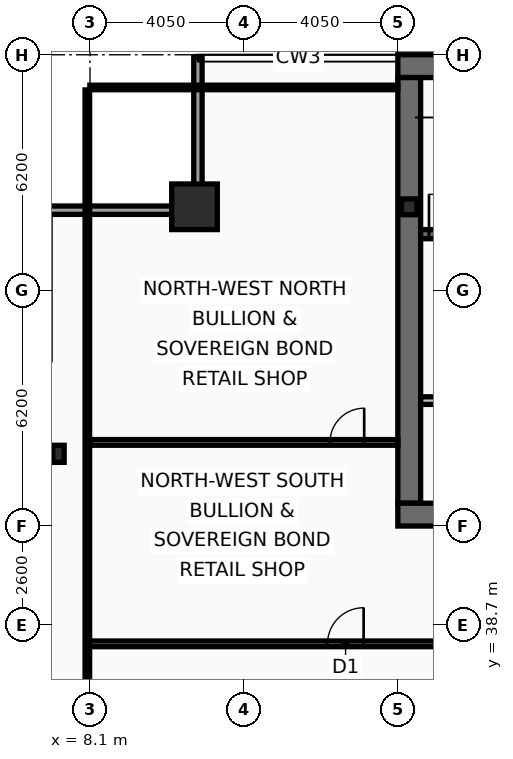
"""IFC4 building model, lengths in metres.
Left out: names, types, materials, properties, quantities, classifications, styles, units other than length and angle.
Written with IfcOpenShell. Run it as: python <this file> out.ifc"""

import sys

from ifc_helpers import new_model, si_unit, direction, frame, frame_2d, origin, origin_2d, place, context, subcontext, project, spatial, rectangle, hollow_rectangle, i_section, extrude, element, fill, save


model = new_model("IFC4")
c1 = context("Model", 3, precision=1e-05, world=origin(), true_north=direction((0.0, 1.0)))
c2 = subcontext(c1, "Body", "Model", "MODEL_VIEW")
j1 = project(units=[si_unit("LENGTHUNIT", "METRE"), si_unit("PLANEANGLEUNIT", "RADIAN")], contexts=[c1])
p1 = place(None, origin())
s1 = spatial("IfcSite", under=j1, at=p1, CompositionType="ELEMENT")
p2 = place(p1, origin())
s2 = spatial("IfcBuilding", under=s1, at=p2, CompositionType="ELEMENT")
p3 = place(p2, frame((0.0, 0.0, 192.2)))
s3 = spatial("IfcBuildingStorey", under=s2, at=p3, CompositionType="ELEMENT", Elevation=192.2)
p4 = place(p3, frame((16.2, 53.4, 0.0), z_axis=(0.0, 0.0, 1.0), x_axis=(1.0, 0.0, 0.0)))
e1 = element("IfcWall", 1, at=p4, inside=s3, PredefinedType="SHEAR", context=c2, shape_type="SweptSolid", body=[
    extrude(rectangle(XDim=40.5, YDim=0.6, at=frame_2d((20.25, 0.0))), origin(), (0.0, 0.0, 1.0), 3.44),
])
p5 = place(p3, frame((16.5, 41.9, 0.0), z_axis=(0.0, 0.0, 1.0), x_axis=(0.0, 1.0, 0.0)))
e2 = element("IfcWall", 2, at=p5, inside=s3, PredefinedType="SHEAR", context=c2, shape_type="SweptSolid", body=[
    extrude(rectangle(XDim=11.2, YDim=0.6, at=frame_2d((5.6, 0.0))), origin(), (0.0, 0.0, 1.0), 3.44),
])
p6 = place(p3, frame((18.65, 41.6, 0.0), z_axis=(0.0, 0.0, 1.0), x_axis=(-1.0, 0.0, 0.0)))
e3 = element("IfcWall", 3, at=p6, inside=s3, PredefinedType="SHEAR", context=c2, shape_type="SweptSolid", body=[
    extrude(rectangle(XDim=2.45, YDim=0.6, at=frame_2d((1.225, 0.0))), origin(), (0.0, 0.0, 1.0), 3.44),
])
p7 = place(p3, frame((16.8, 48.98, 0.0), z_axis=(0.0, 0.0, 1.0), x_axis=(1.0, 0.0, 0.0)))
e4 = element("IfcWall", 4, at=p7, inside=s3, PredefinedType="SHEAR", context=c2, shape_type="SweptSolid", body=[
    extrude(rectangle(XDim=7.42, YDim=0.24, at=frame_2d((3.71, 0.0))), origin(), (0.0, 0.0, 1.0), 3.44),
])
p8 = place(p7, frame((0.22, 0.0, 0.0)))
e5 = element("IfcOpeningElement", 5, at=p8, cuts=e4, PredefinedType="OPENING", context=c2, shape_type="SweptSolid", body=[
    extrude(rectangle(XDim=1.05, YDim=2.15, at=frame_2d((0.525, 1.075))), frame((0.0, 0.13, 0.0), z_axis=(0.0, -1.0, 0.0), x_axis=(1.0, 0.0, 0.0)), (0.0, 0.0, 1.0), 0.26),
])
p9 = place(p3, frame((10.85, 49.7, 0.0), z_axis=(0.0, 0.0, 1.0), x_axis=(1.0, 0.0, 0.0)))
e6 = element("IfcColumn", 6, at=p9, inside=s3, PredefinedType="COLUMN", context=c2, shape_type="SweptSolid", body=[
    extrude(hollow_rectangle(XDim=1.2, YDim=1.2, WallThickness=0.06, at=origin_2d()), origin(), (0.0, 0.0, 1.0), 3.6),
])
p10 = place(p3, frame((7.27, 43.2, 0.0), z_axis=(0.0, 0.0, 1.0), x_axis=(1.0, 0.0, 0.0)))
e7 = element("IfcColumn", 7, at=p10, inside=s3, PredefinedType="COLUMN", context=c2, shape_type="SweptSolid", body=[
    extrude(i_section(OverallWidth=0.3, OverallDepth=0.45, WebThickness=0.014, FlangeThickness=0.026, at=origin_2d()), origin(), (0.0, 0.0, 1.0), 3.6),
])
p11 = place(p3, frame((16.5, 49.7, 0.0), z_axis=(0.0, 0.0, 1.0), x_axis=(1.0, 0.0, 0.0)))
e8 = element("IfcColumn", 8, at=p11, inside=s3, PredefinedType="COLUMN", context=c2, shape_type="SweptSolid", body=[
    extrude(i_section(OverallWidth=0.406, OverallDepth=0.416, WebThickness=0.03, FlangeThickness=0.048, at=origin_2d()), origin(), (0.0, 0.0, 1.0), 3.6),
])
p12 = place(p3, frame((6.83, 49.61, 0.0), z_axis=(0.0, 0.0, 1.0), x_axis=(1.0, 0.0, 0.0)))
e9 = element("IfcWall", 9, at=p12, inside=s3, PredefinedType="SOLIDWALL", context=c2, shape_type="SweptSolid", body=[
    extrude(rectangle(XDim=4.22, YDim=0.22, at=frame_2d((2.11, 0.0))), origin(), (0.0, 0.0, 1.0), 2.83),
])
p13 = place(p3, frame((10.94, 49.72, 0.0), z_axis=(0.0, 0.0, 1.0), x_axis=(0.0, 1.0, 0.0)))
e10 = element("IfcWall", 10, at=p13, inside=s3, PredefinedType="SOLIDWALL", context=c2, shape_type="SweptSolid", body=[
    extrude(rectangle(XDim=3.91, YDim=0.22, at=frame_2d((1.955, 0.0))), origin(), (0.0, 0.0, 1.0), 2.83),
])
p14 = place(p3, frame((16.8, 44.6, 0.0), z_axis=(0.0, 0.0, 1.0), x_axis=(1.0, 0.0, 0.0)))
e11 = element("IfcWall", 11, at=p14, inside=s3, PredefinedType="PARTITIONING", context=c2, shape_type="SweptSolid", body=[
    extrude(rectangle(XDim=4.2, YDim=0.2, at=frame_2d((2.1, 0.0))), origin(), (0.0, 0.0, 1.0), 3.44),
])
p15 = place(p14, frame((1.25, 0.0, 0.0)))
e12 = element("IfcOpeningElement", 12, at=p15, cuts=e11, PredefinedType="OPENING", context=c2, shape_type="SweptSolid", body=[
    extrude(rectangle(XDim=1.05, YDim=2.15, at=frame_2d((0.525, 1.075))), frame((0.0, 0.11, 0.0), z_axis=(0.0, -1.0, 0.0), x_axis=(1.0, 0.0, 0.0)), (0.0, 0.0, 1.0), 0.22),
])
p16 = place(p3, frame((8.03, 38.2, 0.0), z_axis=(0.0, 0.0, 1.0), x_axis=(1.0, 0.0, 0.0)))
e13 = element("IfcWall", 13, at=p16, inside=s3, PredefinedType="PARTITIONING", context=c2, shape_type="SweptSolid", body=[
    extrude(rectangle(XDim=10.52, YDim=0.15, at=frame_2d((5.26, 0.0))), origin(), (0.0, 0.0, 1.0), 2.73),
])
p17 = place(p16, frame((6.32, 0.0, 0.0)))
e14 = element("IfcOpeningElement", 14, at=p17, cuts=e13, PredefinedType="OPENING", context=c2, shape_type="SweptSolid", body=[
    extrude(rectangle(XDim=0.95, YDim=2.05, at=frame_2d((0.475, 1.025))), frame((0.0, 0.085, 0.0), z_axis=(0.0, -1.0, 0.0), x_axis=(1.0, 0.0, 0.0)), (0.0, 0.0, 1.0), 0.17),
])
p18 = place(p3, frame((8.095, 43.5, 0.0), z_axis=(0.0, 0.0, 1.0), x_axis=(1.0, 0.0, 0.0)))
e15 = element("IfcWall", 15, at=p18, inside=s3, PredefinedType="PARTITIONING", context=c2, shape_type="SweptSolid", body=[
    extrude(rectangle(XDim=8.105, YDim=0.15, at=frame_2d((4.052, 0.0))), origin(), (0.0, 0.0, 1.0), 2.73),
])
p19 = place(p18, frame((6.32, 0.0, 0.0)))
e16 = element("IfcOpeningElement", 16, at=p19, cuts=e15, PredefinedType="OPENING", context=c2, shape_type="SweptSolid", body=[
    extrude(rectangle(XDim=0.9, YDim=2.05, at=frame_2d((0.45, 1.025))), frame((0.0, 0.085, 0.0), z_axis=(0.0, -1.0, 0.0), x_axis=(1.0, 0.0, 0.0)), (0.0, 0.0, 1.0), 0.17),
])
p20 = place(p3, frame((8.03, 10.665, 0.0), z_axis=(0.0, 0.0, 1.0), x_axis=(0.0, 1.0, 0.0)))
e17 = element("IfcWall", 17, at=p20, inside=s3, PredefinedType="PARTITIONING", context=c2, shape_type="SweptSolid", body=[
    extrude(rectangle(XDim=42.11, YDim=0.12, at=frame_2d((21.055, 0.0))), origin(), (0.0, 0.0, 1.0), 2.73),
])
p21 = place(p3, frame((8.095, 52.84, 0.0), z_axis=(0.0, 0.0, 1.0), x_axis=(1.0, 0.0, 0.0)))
e18 = element("IfcWall", 18, at=p21, inside=s3, PredefinedType="PARTITIONING", context=c2, shape_type="SweptSolid", body=[
    extrude(rectangle(XDim=8.105, YDim=0.12, at=frame_2d((4.052, 0.0))), origin(), (0.0, 0.0, 1.0), 3.44),
])
p22 = place(p8, origin())
e19 = element("IfcDoor", 19, at=p22, inside=s3, OperationType="SINGLE_SWING_LEFT", PredefinedType="DOOR", context=c2, shape_type="SweptSolid", body=[
    extrude(rectangle(XDim=1.05, YDim=2.15, at=frame_2d((0.525, 1.075))), frame((0.0, 0.025, 0.0), z_axis=(0.0, -1.0, 0.0), x_axis=(1.0, 0.0, 0.0)), (0.0, 0.0, 1.0), 0.05),
])
fill(e5, e19)
p23 = place(p17, origin())
e20 = element("IfcDoor", 20, at=p23, inside=s3, OperationType="SINGLE_SWING_RIGHT", PredefinedType="DOOR", context=c2, shape_type="SweptSolid", body=[
    extrude(rectangle(XDim=0.95, YDim=2.05, at=frame_2d((0.475, 1.025))), frame((0.0, 0.025, 0.0), z_axis=(0.0, -1.0, 0.0), x_axis=(1.0, 0.0, 0.0)), (0.0, 0.0, 1.0), 0.05),
])
fill(e14, e20)
p24 = place(p19, origin())
e21 = element("IfcDoor", 21, at=p24, inside=s3, OperationType="SINGLE_SWING_RIGHT", PredefinedType="DOOR", context=c2, shape_type="SweptSolid", body=[
    extrude(rectangle(XDim=0.9, YDim=2.05, at=frame_2d((0.45, 1.025))), frame((0.0, 0.025, 0.0), z_axis=(0.0, -1.0, 0.0), x_axis=(1.0, 0.0, 0.0)), (0.0, 0.0, 1.0), 0.05),
])
fill(e16, e21)
save(model, sys.argv[1])
